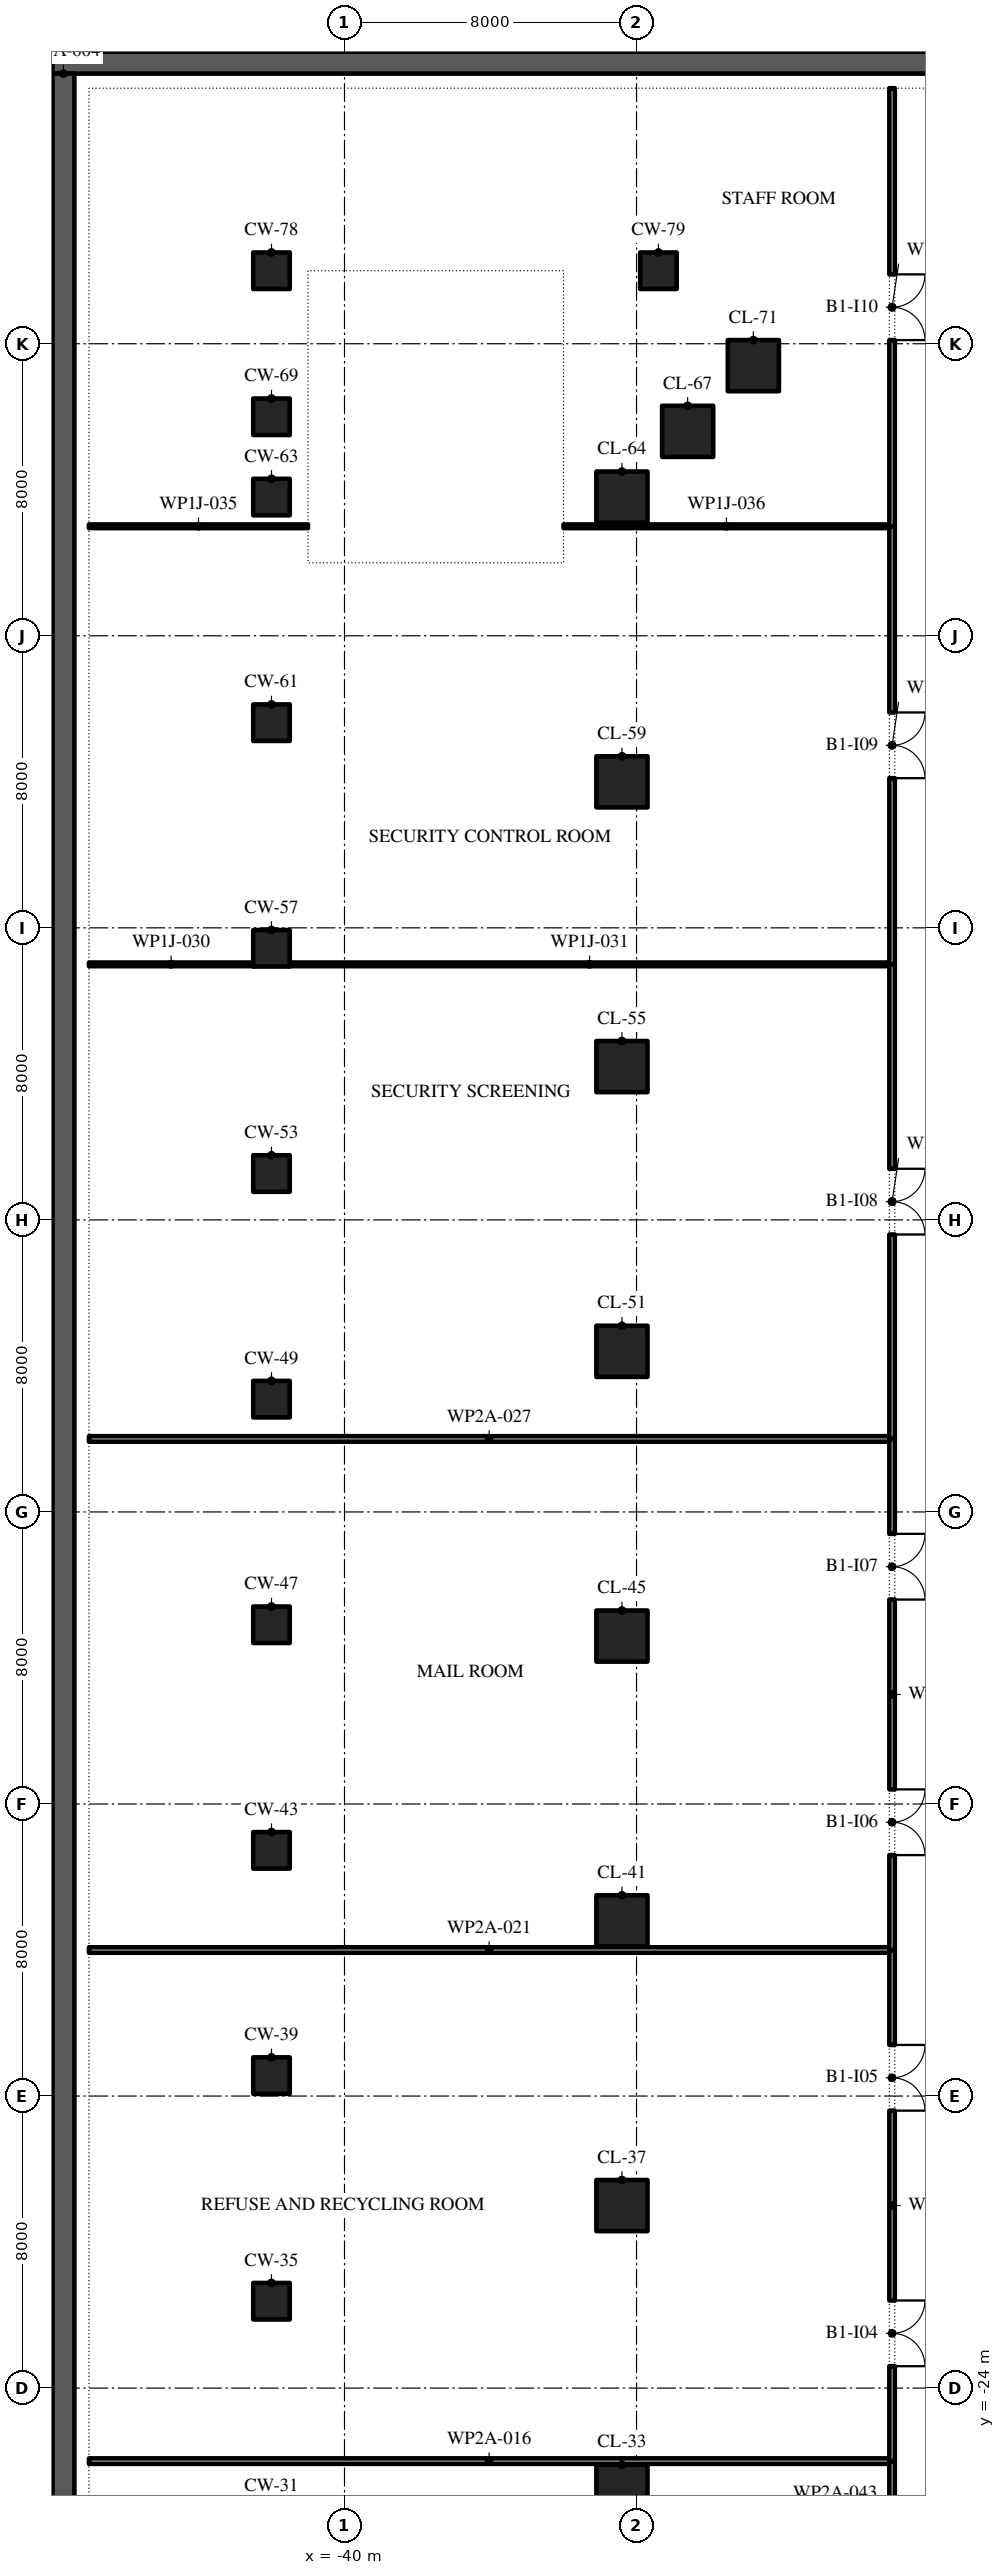
"""IFC4 building model, lengths in metres.
Left out: names, types, materials, properties, quantities, classifications, styles, units other than length and angle.
Written with IfcOpenShell. Run it as: python <this file> out.ifc"""

import sys

from ifc_helpers import new_model, si_unit, direction, frame, frame_2d, origin, origin_2d, place, context, subcontext, project, spatial, rectangle, extrude, element, fill, save


model = new_model("IFC4")
c1 = context("Model", 3, precision=1e-05, world=origin(), true_north=direction((0.0, 1.0)))
c2 = subcontext(c1, "Body", "Model", "MODEL_VIEW")
j1 = project(units=[si_unit("LENGTHUNIT", "METRE"), si_unit("PLANEANGLEUNIT", "RADIAN")], contexts=[c1])
p1 = place(None, origin())
s1 = spatial("IfcSite", under=j1, at=p1, CompositionType="ELEMENT")
p2 = place(p1, origin())
s2 = spatial("IfcBuilding", under=s1, at=p2, CompositionType="ELEMENT")
p3 = place(p2, frame((0.0, 0.0, -5.2)))
s3 = spatial("IfcBuildingStorey", under=s2, at=p3, CompositionType="ELEMENT", Elevation=-5.2)
p4 = place(p3, frame((-48.0, 39.7, 0.0), z_axis=(0.0, 0.0, 1.0), x_axis=(1.0, 0.0, 0.0)))
e1 = element("IfcWall", 1, at=p4, inside=s3, PredefinedType="SOLIDWALL", context=c2, shape_type="SweptSolid", body=[
    extrude(rectangle(XDim=96.0, YDim=0.6, at=frame_2d((48.0, 0.0))), origin(), (0.0, 0.0, 1.0), 4.8),
])
p5 = place(p3, frame((-47.7, -55.4, 0.0), z_axis=(0.0, 0.0, 1.0), x_axis=(0.0, 1.0, 0.0)))
e2 = element("IfcWall", 2, at=p5, inside=s3, PredefinedType="SOLIDWALL", context=c2, shape_type="SweptSolid", body=[
    extrude(rectangle(XDim=94.8, YDim=0.6, at=frame_2d((47.4, 0.0))), origin(), (0.0, 0.0, 1.0), 4.8),
])
p6 = place(p3, frame((-32.4, -26.8, 0.0), z_axis=(0.0, 0.0, 1.0), x_axis=(1.0, 0.0, 0.0)))
e3 = element("IfcColumn", 3, at=p6, inside=s3, PredefinedType="COLUMN", context=c2, shape_type="SweptSolid", body=[
    extrude(rectangle(XDim=1.4, YDim=1.4, at=origin_2d()), origin(), (0.0, 0.0, 1.0), 5.2),
])
p7 = place(p3, frame((-42.0, -21.62, 0.0), z_axis=(0.0, 0.0, 1.0), x_axis=(1.0, 0.0, 0.0)))
e4 = element("IfcColumn", 4, at=p7, inside=s3, PredefinedType="COLUMN", context=c2, shape_type="SweptSolid", body=[
    extrude(rectangle(XDim=1.0, YDim=1.0, at=origin_2d()), origin(), (0.0, 0.0, 1.0), 5.2),
])
p8 = place(p3, frame((-32.4, -19.0, 0.0), z_axis=(0.0, 0.0, 1.0), x_axis=(1.0, 0.0, 0.0)))
e5 = element("IfcColumn", 5, at=p8, inside=s3, PredefinedType="COLUMN", context=c2, shape_type="SweptSolid", body=[
    extrude(rectangle(XDim=1.4, YDim=1.4, at=origin_2d()), origin(), (0.0, 0.0, 1.0), 5.2),
])
p9 = place(p3, frame((-42.0, -15.44, 0.0), z_axis=(0.0, 0.0, 1.0), x_axis=(1.0, 0.0, 0.0)))
e6 = element("IfcColumn", 6, at=p9, inside=s3, PredefinedType="COLUMN", context=c2, shape_type="SweptSolid", body=[
    extrude(rectangle(XDim=1.0, YDim=1.0, at=origin_2d()), origin(), (0.0, 0.0, 1.0), 5.2),
])
p10 = place(p3, frame((-32.4, -11.2, 0.0), z_axis=(0.0, 0.0, 1.0), x_axis=(1.0, 0.0, 0.0)))
e7 = element("IfcColumn", 7, at=p10, inside=s3, PredefinedType="COLUMN", context=c2, shape_type="SweptSolid", body=[
    extrude(rectangle(XDim=1.4, YDim=1.4, at=origin_2d()), origin(), (0.0, 0.0, 1.0), 5.2),
])
p11 = place(p3, frame((-42.0, -9.27, 0.0), z_axis=(0.0, 0.0, 1.0), x_axis=(1.0, 0.0, 0.0)))
e8 = element("IfcColumn", 8, at=p11, inside=s3, PredefinedType="COLUMN", context=c2, shape_type="SweptSolid", body=[
    extrude(rectangle(XDim=1.0, YDim=1.0, at=origin_2d()), origin(), (0.0, 0.0, 1.0), 5.2),
])
p12 = place(p3, frame((-32.4, -3.4, 0.0), z_axis=(0.0, 0.0, 1.0), x_axis=(1.0, 0.0, 0.0)))
e9 = element("IfcColumn", 9, at=p12, inside=s3, PredefinedType="COLUMN", context=c2, shape_type="SweptSolid", body=[
    extrude(rectangle(XDim=1.4, YDim=1.4, at=origin_2d()), origin(), (0.0, 0.0, 1.0), 5.2),
])
for number, where, z_axis, x_axis in (
    (10, (-42.0, -3.09, 0.0), (0.0, 0.0, 1.0), (1.0, 0.0, 0.0)),
    (11, (-42.0, 3.09, 0.0), (0.0, 0.0, 1.0), (1.0, 0.0, 0.0)),
):
    element("IfcColumn", number, at=place(p3, frame(where, z_axis=z_axis, x_axis=x_axis)), inside=s3, PredefinedType="COLUMN", context=c2, shape_type="SweptSolid", body=[
        extrude(rectangle(XDim=1.0, YDim=1.0, at=origin_2d()), origin(), (0.0, 0.0, 1.0), 5.2),
    ])
p13 = place(p3, frame((-32.4, 4.4, 0.0), z_axis=(0.0, 0.0, 1.0), x_axis=(1.0, 0.0, 0.0)))
e12 = element("IfcColumn", 12, at=p13, inside=s3, PredefinedType="COLUMN", context=c2, shape_type="SweptSolid", body=[
    extrude(rectangle(XDim=1.4, YDim=1.4, at=origin_2d()), origin(), (0.0, 0.0, 1.0), 5.2),
])
p14 = place(p3, frame((-42.0, 9.27, 0.0), z_axis=(0.0, 0.0, 1.0), x_axis=(1.0, 0.0, 0.0)))
e13 = element("IfcColumn", 13, at=p14, inside=s3, PredefinedType="COLUMN", context=c2, shape_type="SweptSolid", body=[
    extrude(rectangle(XDim=1.0, YDim=1.0, at=origin_2d()), origin(), (0.0, 0.0, 1.0), 5.2),
])
p15 = place(p3, frame((-32.4, 12.2, 0.0), z_axis=(0.0, 0.0, 1.0), x_axis=(1.0, 0.0, 0.0)))
e14 = element("IfcColumn", 14, at=p15, inside=s3, PredefinedType="COLUMN", context=c2, shape_type="SweptSolid", body=[
    extrude(rectangle(XDim=1.4, YDim=1.4, at=origin_2d()), origin(), (0.0, 0.0, 1.0), 5.2),
])
p16 = place(p3, frame((-42.0, 15.44, 0.0), z_axis=(0.0, 0.0, 1.0), x_axis=(1.0, 0.0, 0.0)))
e15 = element("IfcColumn", 15, at=p16, inside=s3, PredefinedType="COLUMN", context=c2, shape_type="SweptSolid", body=[
    extrude(rectangle(XDim=1.0, YDim=1.0, at=origin_2d()), origin(), (0.0, 0.0, 1.0), 5.2),
])
p17 = place(p3, frame((-32.4, 20.0, 0.0), z_axis=(0.0, 0.0, 1.0), x_axis=(1.0, 0.0, 0.0)))
e16 = element("IfcColumn", 16, at=p17, inside=s3, PredefinedType="COLUMN", context=c2, shape_type="SweptSolid", body=[
    extrude(rectangle(XDim=1.4, YDim=1.4, at=origin_2d()), origin(), (0.0, 0.0, 1.0), 5.2),
])
for number, where, z_axis, x_axis in (
    (17, (-42.0, 21.62, 0.0), (0.0, 0.0, 1.0), (1.0, 0.0, 0.0)),
    (18, (-42.0, 27.8, 0.0), (0.0, 0.0, 1.0), (1.0, 0.0, 0.0)),
):
    element("IfcColumn", number, at=place(p3, frame(where, z_axis=z_axis, x_axis=x_axis)), inside=s3, PredefinedType="COLUMN", context=c2, shape_type="SweptSolid", body=[
        extrude(rectangle(XDim=1.0, YDim=1.0, at=origin_2d()), origin(), (0.0, 0.0, 1.0), 5.2),
    ])
for number, where, z_axis, x_axis in (
    (19, (-32.4, 27.8, 0.0), (0.0, 0.0, 1.0), (1.0, 0.0, 0.0)),
    (20, (-30.6, 29.6, 0.0), (0.0, 0.0, 1.0), (1.0, 0.0, 0.0)),
):
    element("IfcColumn", number, at=place(p3, frame(where, z_axis=z_axis, x_axis=x_axis)), inside=s3, PredefinedType="COLUMN", context=c2, shape_type="SweptSolid", body=[
        extrude(rectangle(XDim=1.4, YDim=1.4, at=origin_2d()), origin(), (0.0, 0.0, 1.0), 5.2),
    ])
p18 = place(p3, frame((-42.0, 30.0, 0.0), z_axis=(0.0, 0.0, 1.0), x_axis=(1.0, 0.0, 0.0)))
e21 = element("IfcColumn", 21, at=p18, inside=s3, PredefinedType="COLUMN", context=c2, shape_type="SweptSolid", body=[
    extrude(rectangle(XDim=1.0, YDim=1.0, at=origin_2d()), origin(), (0.0, 0.0, 1.0), 5.2),
])
p19 = place(p3, frame((-28.8, 31.4, 0.0), z_axis=(0.0, 0.0, 1.0), x_axis=(1.0, 0.0, 0.0)))
e22 = element("IfcColumn", 22, at=p19, inside=s3, PredefinedType="COLUMN", context=c2, shape_type="SweptSolid", body=[
    extrude(rectangle(XDim=1.4, YDim=1.4, at=origin_2d()), origin(), (0.0, 0.0, 1.0), 5.2),
])
for number, where, z_axis, x_axis in (
    (23, (-42.0, 34.0, 0.0), (0.0, 0.0, 1.0), (1.0, 0.0, 0.0)),
    (24, (-31.4, 34.0, 0.0), (0.0, 0.0, 1.0), (1.0, 0.0, 0.0)),
):
    element("IfcColumn", number, at=place(p3, frame(where, z_axis=z_axis, x_axis=x_axis)), inside=s3, PredefinedType="COLUMN", context=c2, shape_type="SweptSolid", body=[
        extrude(rectangle(XDim=1.0, YDim=1.0, at=origin_2d()), origin(), (0.0, 0.0, 1.0), 5.2),
    ])
for number, where, z_axis, x_axis in (
    (25, (-47.0, -26.0, 0.0), (0.0, 0.0, 1.0), (1.0, 0.0, 0.0)),
    (26, (-47.0, -12.0, 0.0), (0.0, 0.0, 1.0), (1.0, 0.0, 0.0)),
    (27, (-47.0, 2.0, 0.0), (0.0, 0.0, 1.0), (1.0, 0.0, 0.0)),
):
    element("IfcWall", number, at=place(p3, frame(where, z_axis=z_axis, x_axis=x_axis)), inside=s3, PredefinedType="PARTITIONING", context=c2, shape_type="SweptSolid", body=[
        extrude(rectangle(XDim=21.925, YDim=0.15, at=frame_2d((10.962, 0.0))), origin(), (0.0, 0.0, 1.0), 4.9),
    ])
p20 = place(p3, frame((-47.0, 15.0, 0.0), z_axis=(0.0, 0.0, 1.0), x_axis=(1.0, 0.0, 0.0)))
e28 = element("IfcWall", 28, at=p20, inside=s3, PredefinedType="PARTITIONING", context=c2, shape_type="SweptSolid", body=[
    extrude(rectangle(XDim=4.5, YDim=0.1, at=frame_2d((2.25, 0.0))), origin(), (0.0, 0.0, 1.0), 4.9),
])
p21 = place(p3, frame((-41.5, 15.0, 0.0), z_axis=(0.0, 0.0, 1.0), x_axis=(1.0, 0.0, 0.0)))
e29 = element("IfcWall", 29, at=p21, inside=s3, PredefinedType="PARTITIONING", context=c2, shape_type="SweptSolid", body=[
    extrude(rectangle(XDim=16.425, YDim=0.1, at=frame_2d((8.212, 0.0))), origin(), (0.0, 0.0, 1.0), 4.9),
])
p22 = place(p3, frame((-47.0, 27.0, 0.0), z_axis=(0.0, 0.0, 1.0), x_axis=(1.0, 0.0, 0.0)))
e30 = element("IfcWall", 30, at=p22, inside=s3, PredefinedType="PARTITIONING", context=c2, shape_type="SweptSolid", body=[
    extrude(rectangle(XDim=6.0, YDim=0.1, at=frame_2d((3.0, 0.0))), origin(), (0.0, 0.0, 1.0), 4.9),
])
p23 = place(p3, frame((-34.0, 27.0, 0.0), z_axis=(0.0, 0.0, 1.0), x_axis=(1.0, 0.0, 0.0)))
e31 = element("IfcWall", 31, at=p23, inside=s3, PredefinedType="PARTITIONING", context=c2, shape_type="SweptSolid", body=[
    extrude(rectangle(XDim=8.925, YDim=0.1, at=frame_2d((4.462, 0.0))), origin(), (0.0, 0.0, 1.0), 4.9),
])
p24 = place(p3, frame((-25.0, -30.9, 0.0), z_axis=(0.0, 0.0, 1.0), x_axis=(0.0, 1.0, 0.0)))
e32 = element("IfcWall", 32, at=p24, inside=s3, PredefinedType="PARTITIONING", context=c2, shape_type="SweptSolid", body=[
    extrude(rectangle(XDim=4.9, YDim=0.15, at=frame_2d((2.45, 0.0))), origin(), (0.0, 0.0, 1.0), 4.9),
])
p25 = place(p3, frame((-25.0, -26.0, 0.0), z_axis=(0.0, 0.0, 1.0), x_axis=(0.0, 1.0, 0.0)))
e33 = element("IfcWall", 33, at=p25, inside=s3, PredefinedType="PARTITIONING", context=c2, shape_type="SweptSolid", body=[
    extrude(rectangle(XDim=14.0, YDim=0.15, at=frame_2d((7.0, 0.0))), origin(), (0.0, 0.0, 1.0), 4.9),
])
p26 = place(p25, frame((2.6, 0.0, 0.0)))
e34 = element("IfcOpeningElement", 34, at=p26, cuts=e33, PredefinedType="OPENING", context=c2, shape_type="SweptSolid", body=[
    extrude(rectangle(XDim=1.8, YDim=2.1, at=frame_2d((0.9, 1.05))), frame((0.0, 0.085, 0.0), z_axis=(0.0, -1.0, 0.0), x_axis=(1.0, 0.0, 0.0)), (0.0, 0.0, 1.0), 0.17),
])
p27 = place(p25, frame((9.6, 0.0, 0.0)))
e35 = element("IfcOpeningElement", 35, at=p27, cuts=e33, PredefinedType="OPENING", context=c2, shape_type="SweptSolid", body=[
    extrude(rectangle(XDim=1.8, YDim=2.1, at=frame_2d((0.9, 1.05))), frame((0.0, 0.085, 0.0), z_axis=(0.0, -1.0, 0.0), x_axis=(1.0, 0.0, 0.0)), (0.0, 0.0, 1.0), 0.17),
])
p28 = place(p3, frame((-25.0, -12.0, 0.0), z_axis=(0.0, 0.0, 1.0), x_axis=(0.0, 1.0, 0.0)))
e36 = element("IfcWall", 36, at=p28, inside=s3, PredefinedType="PARTITIONING", context=c2, shape_type="SweptSolid", body=[
    extrude(rectangle(XDim=14.0, YDim=0.15, at=frame_2d((7.0, 0.0))), origin(), (0.0, 0.0, 1.0), 4.9),
])
p29 = place(p28, frame((2.6, 0.0, 0.0)))
e37 = element("IfcOpeningElement", 37, at=p29, cuts=e36, PredefinedType="OPENING", context=c2, shape_type="SweptSolid", body=[
    extrude(rectangle(XDim=1.8, YDim=2.1, at=frame_2d((0.9, 1.05))), frame((0.0, 0.085, 0.0), z_axis=(0.0, -1.0, 0.0), x_axis=(1.0, 0.0, 0.0)), (0.0, 0.0, 1.0), 0.17),
])
p30 = place(p28, frame((9.6, 0.0, 0.0)))
e38 = element("IfcOpeningElement", 38, at=p30, cuts=e36, PredefinedType="OPENING", context=c2, shape_type="SweptSolid", body=[
    extrude(rectangle(XDim=1.8, YDim=2.1, at=frame_2d((0.9, 1.05))), frame((0.0, 0.085, 0.0), z_axis=(0.0, -1.0, 0.0), x_axis=(1.0, 0.0, 0.0)), (0.0, 0.0, 1.0), 0.17),
])
p31 = place(p3, frame((-25.0, 2.0, 0.0), z_axis=(0.0, 0.0, 1.0), x_axis=(0.0, 1.0, 0.0)))
e39 = element("IfcWall", 39, at=p31, inside=s3, PredefinedType="PARTITIONING", context=c2, shape_type="SweptSolid", body=[
    extrude(rectangle(XDim=13.0, YDim=0.15, at=frame_2d((6.5, 0.0))), origin(), (0.0, 0.0, 1.0), 4.9),
])
p32 = place(p31, frame((5.6, 0.0, 0.0)))
e40 = element("IfcOpeningElement", 40, at=p32, cuts=e39, PredefinedType="OPENING", context=c2, shape_type="SweptSolid", body=[
    extrude(rectangle(XDim=1.8, YDim=2.1, at=frame_2d((0.9, 1.05))), frame((0.0, 0.085, 0.0), z_axis=(0.0, -1.0, 0.0), x_axis=(1.0, 0.0, 0.0)), (0.0, 0.0, 1.0), 0.17),
])
p33 = place(p3, frame((-25.0, 15.0, 0.0), z_axis=(0.0, 0.0, 1.0), x_axis=(0.0, 1.0, 0.0)))
e41 = element("IfcWall", 41, at=p33, inside=s3, PredefinedType="PARTITIONING", context=c2, shape_type="SweptSolid", body=[
    extrude(rectangle(XDim=12.0, YDim=0.15, at=frame_2d((6.0, 0.0))), origin(), (0.0, 0.0, 1.0), 4.9),
])
p34 = place(p33, frame((5.1, 0.0, 0.0)))
e42 = element("IfcOpeningElement", 42, at=p34, cuts=e41, PredefinedType="OPENING", context=c2, shape_type="SweptSolid", body=[
    extrude(rectangle(XDim=1.8, YDim=2.1, at=frame_2d((0.9, 1.05))), frame((0.0, 0.085, 0.0), z_axis=(0.0, -1.0, 0.0), x_axis=(1.0, 0.0, 0.0)), (0.0, 0.0, 1.0), 0.17),
])
p35 = place(p3, frame((-25.0, 27.0, 0.0), z_axis=(0.0, 0.0, 1.0), x_axis=(0.0, 1.0, 0.0)))
e43 = element("IfcWall", 43, at=p35, inside=s3, PredefinedType="PARTITIONING", context=c2, shape_type="SweptSolid", body=[
    extrude(rectangle(XDim=12.0, YDim=0.15, at=frame_2d((6.0, 0.0))), origin(), (0.0, 0.0, 1.0), 4.9),
])
p36 = place(p35, frame((5.1, 0.0, 0.0)))
e44 = element("IfcOpeningElement", 44, at=p36, cuts=e43, PredefinedType="OPENING", context=c2, shape_type="SweptSolid", body=[
    extrude(rectangle(XDim=1.8, YDim=2.1, at=frame_2d((0.9, 1.05))), frame((0.0, 0.085, 0.0), z_axis=(0.0, -1.0, 0.0), x_axis=(1.0, 0.0, 0.0)), (0.0, 0.0, 1.0), 0.17),
])
p37 = place(p26, frame((1.8, 0.0, 0.0), z_axis=(0.0, 0.0, 1.0), x_axis=(-1.0, 0.0, 0.0)))
e45 = element("IfcDoor", 45, at=p37, inside=s3, OperationType="SINGLE_SWING_LEFT", PredefinedType="DOOR", context=c2, shape_type="SweptSolid", body=[
    extrude(rectangle(XDim=1.8, YDim=2.1, at=frame_2d((0.9, 1.05))), frame((0.0, 0.025, 0.0), z_axis=(0.0, -1.0, 0.0), x_axis=(1.0, 0.0, 0.0)), (0.0, 0.0, 1.0), 0.05),
])
fill(e34, e45)
p38 = place(p27, frame((1.8, 0.0, 0.0), z_axis=(0.0, 0.0, 1.0), x_axis=(-1.0, 0.0, 0.0)))
e46 = element("IfcDoor", 46, at=p38, inside=s3, OperationType="SINGLE_SWING_LEFT", PredefinedType="DOOR", context=c2, shape_type="SweptSolid", body=[
    extrude(rectangle(XDim=1.8, YDim=2.1, at=frame_2d((0.9, 1.05))), frame((0.0, 0.025, 0.0), z_axis=(0.0, -1.0, 0.0), x_axis=(1.0, 0.0, 0.0)), (0.0, 0.0, 1.0), 0.05),
])
fill(e35, e46)
p39 = place(p29, frame((1.8, 0.0, 0.0), z_axis=(0.0, 0.0, 1.0), x_axis=(-1.0, 0.0, 0.0)))
e47 = element("IfcDoor", 47, at=p39, inside=s3, OperationType="SINGLE_SWING_LEFT", PredefinedType="DOOR", context=c2, shape_type="SweptSolid", body=[
    extrude(rectangle(XDim=1.8, YDim=2.1, at=frame_2d((0.9, 1.05))), frame((0.0, 0.025, 0.0), z_axis=(0.0, -1.0, 0.0), x_axis=(1.0, 0.0, 0.0)), (0.0, 0.0, 1.0), 0.05),
])
fill(e37, e47)
p40 = place(p30, frame((1.8, 0.0, 0.0), z_axis=(0.0, 0.0, 1.0), x_axis=(-1.0, 0.0, 0.0)))
e48 = element("IfcDoor", 48, at=p40, inside=s3, OperationType="SINGLE_SWING_LEFT", PredefinedType="DOOR", context=c2, shape_type="SweptSolid", body=[
    extrude(rectangle(XDim=1.8, YDim=2.1, at=frame_2d((0.9, 1.05))), frame((0.0, 0.025, 0.0), z_axis=(0.0, -1.0, 0.0), x_axis=(1.0, 0.0, 0.0)), (0.0, 0.0, 1.0), 0.05),
])
fill(e38, e48)
p41 = place(p32, frame((1.8, 0.0, 0.0), z_axis=(0.0, 0.0, 1.0), x_axis=(-1.0, 0.0, 0.0)))
e49 = element("IfcDoor", 49, at=p41, inside=s3, OperationType="SINGLE_SWING_RIGHT", PredefinedType="DOOR", context=c2, shape_type="SweptSolid", body=[
    extrude(rectangle(XDim=1.8, YDim=2.1, at=frame_2d((0.9, 1.05))), frame((0.0, 0.025, 0.0), z_axis=(0.0, -1.0, 0.0), x_axis=(1.0, 0.0, 0.0)), (0.0, 0.0, 1.0), 0.05),
])
fill(e40, e49)
p42 = place(p34, frame((1.8, 0.0, 0.0), z_axis=(0.0, 0.0, 1.0), x_axis=(-1.0, 0.0, 0.0)))
e50 = element("IfcDoor", 50, at=p42, inside=s3, OperationType="SINGLE_SWING_RIGHT", PredefinedType="DOOR", context=c2, shape_type="SweptSolid", body=[
    extrude(rectangle(XDim=1.8, YDim=2.1, at=frame_2d((0.9, 1.05))), frame((0.0, 0.025, 0.0), z_axis=(0.0, -1.0, 0.0), x_axis=(1.0, 0.0, 0.0)), (0.0, 0.0, 1.0), 0.05),
])
fill(e42, e50)
p43 = place(p36, frame((1.8, 0.0, 0.0), z_axis=(0.0, 0.0, 1.0), x_axis=(-1.0, 0.0, 0.0)))
e51 = element("IfcDoor", 51, at=p43, inside=s3, OperationType="SINGLE_SWING_LEFT", PredefinedType="DOOR", context=c2, shape_type="SweptSolid", body=[
    extrude(rectangle(XDim=1.8, YDim=2.1, at=frame_2d((0.9, 1.05))), frame((0.0, 0.025, 0.0), z_axis=(0.0, -1.0, 0.0), x_axis=(1.0, 0.0, 0.0)), (0.0, 0.0, 1.0), 0.05),
])
fill(e44, e51)
save(model, sys.argv[1])
